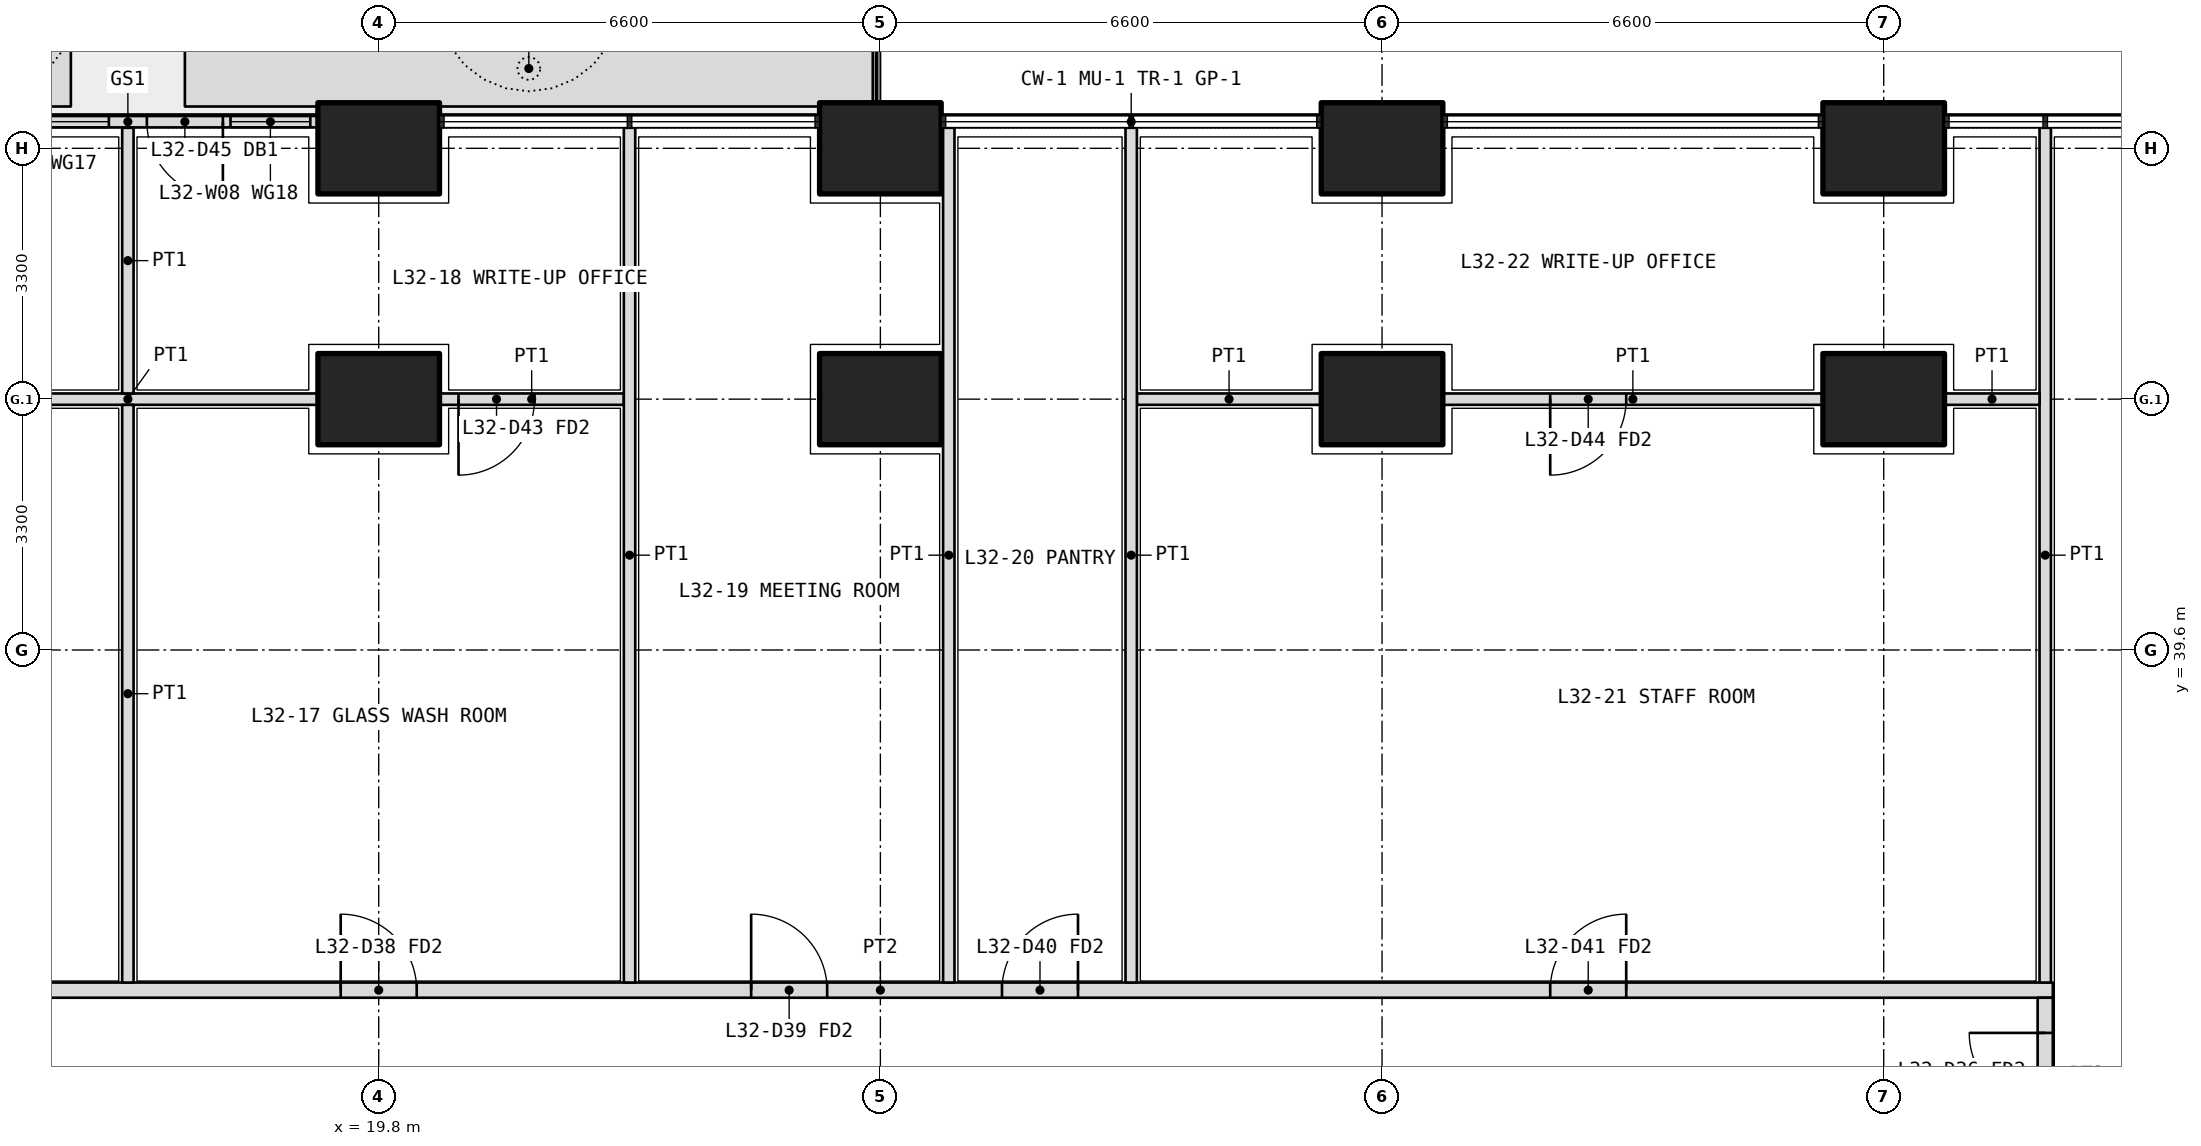
"""IFC4 building model, lengths in metres.
Left out: names, types, materials, properties, quantities, classifications, styles, units other than length and angle.
Written with IfcOpenShell. Run it as: python <this file> out.ifc"""

import sys

from ifc_helpers import new_model, si_unit, direction, frame, frame_2d, origin, origin_2d, place, context, subcontext, project, spatial, polyline, rectangle, outline, extrude, element, fill, save


model = new_model("IFC4")
c1 = context("Model", 3, precision=1e-05, world=origin(), true_north=direction((0.0, 1.0)))
c2 = subcontext(c1, "Body", "Model", "MODEL_VIEW")
j1 = project(units=[si_unit("LENGTHUNIT", "METRE"), si_unit("PLANEANGLEUNIT", "RADIAN")], contexts=[c1])
p1 = place(None, origin())
s1 = spatial("IfcSite", under=j1, at=p1, CompositionType="ELEMENT")
p2 = place(p1, origin())
s2 = spatial("IfcBuilding", under=s1, at=p2, CompositionType="ELEMENT")
p3 = place(p2, frame((0.0, 0.0, 141.0)))
s3 = spatial("IfcBuildingStorey", under=s2, at=p3, CompositionType="ELEMENT", Elevation=141.0)
for number, where, z_axis, x_axis in (
    (1, (19.8, 46.2, 0.0), (0.0, 0.0, 1.0), (1.0, 0.0, 0.0)),
    (2, (26.4, 46.2, 0.0), (0.0, 0.0, 1.0), (1.0, 0.0, 0.0)),
    (3, (33.0, 46.2, 0.0), (0.0, 0.0, 1.0), (1.0, 0.0, 0.0)),
    (4, (39.6, 46.2, 0.0), (0.0, 0.0, 1.0), (1.0, 0.0, 0.0)),
    (5, (19.8, 42.9, 0.0), (0.0, 0.0, 1.0), (1.0, 0.0, 0.0)),
    (6, (26.4, 42.9, 0.0), (0.0, 0.0, 1.0), (1.0, 0.0, 0.0)),
    (7, (33.0, 42.9, 0.0), (0.0, 0.0, 1.0), (1.0, 0.0, 0.0)),
    (8, (39.6, 42.9, 0.0), (0.0, 0.0, 1.0), (1.0, 0.0, 0.0)),
):
    element("IfcColumn", number, at=place(p3, frame(where, z_axis=z_axis, x_axis=x_axis)), inside=s3, PredefinedType="COLUMN", context=c2, shape_type="SweptSolid", body=[
        extrude(rectangle(XDim=1.6, YDim=1.2, at=origin_2d()), origin(), (0.0, 0.0, 1.0), 4.2),
    ])
p4 = place(p3, origin())
e9 = element("IfcWall", 9, at=p4, inside=s3, PredefinedType="USERDEFINED", context=c2, shape_type="SweptSolid", body=[
    extrude(outline(polyline([(13.3, 46.75), (15.75, 46.75), (15.75, 47.75), (13.3, 47.75), (13.3, 46.75)]), holes=[polyline([(13.45, 46.9), (15.6, 46.9), (15.6, 47.6), (13.45, 47.6), (13.45, 46.9)])]), origin(), (0.0, 0.0, 1.0), 1.05),
])
p5 = place(p3, origin())
e10 = element("IfcWall", 10, at=p5, inside=s3, PredefinedType="USERDEFINED", context=c2, shape_type="SweptSolid", body=[
    extrude(outline(polyline([(17.25, 46.75), (26.3, 46.75), (26.3, 47.75), (17.25, 47.75), (17.25, 46.75)]), holes=[polyline([(17.4, 46.9), (26.15, 46.9), (26.15, 47.6), (17.4, 47.6), (17.4, 46.9)])]), origin(), (0.0, 0.0, 1.0), 1.05),
])
p6 = place(p3, frame((19.0, 46.55, 0.0), z_axis=(0.0, 0.0, 1.0), x_axis=(-1.0, 0.0, 0.0)))
e11 = element("IfcWall", 11, at=p6, inside=s3, PredefinedType="SOLIDWALL", context=c2, shape_type="SweptSolid", body=[
    extrude(rectangle(XDim=5.0, YDim=0.15, at=frame_2d((2.5, 0.0))), origin(), (0.0, 0.0, 1.0), 2.6),
])
p7 = place(p6, frame((1.25, 0.0, 0.0)))
e12 = element("IfcOpeningElement", 12, at=p7, cuts=e11, PredefinedType="OPENING", context=c2, shape_type="SweptSolid", body=[
    extrude(rectangle(XDim=1.0, YDim=2.4, at=frame_2d((0.5, 1.2))), frame((0.0, 0.085, 0.0), z_axis=(0.0, -1.0, 0.0), x_axis=(1.0, 0.0, 0.0)), (0.0, 0.0, 1.0), 0.17),
])
p8 = place(p6, frame((0.1, 0.0, 0.1)))
e13 = element("IfcOpeningElement", 13, at=p8, cuts=e11, PredefinedType="OPENING", context=c2, shape_type="SweptSolid", body=[
    extrude(rectangle(XDim=1.05, YDim=2.2, at=frame_2d((0.525, 1.1))), frame((0.0, 0.085, 0.0), z_axis=(0.0, -1.0, 0.0), x_axis=(1.0, 0.0, 0.0)), (0.0, 0.0, 1.0), 0.17),
])
p9 = place(p6, frame((2.75, 0.0, 0.1)))
e14 = element("IfcOpeningElement", 14, at=p9, cuts=e11, PredefinedType="OPENING", context=c2, shape_type="SweptSolid", body=[
    extrude(rectangle(XDim=2.15, YDim=2.2, at=frame_2d((1.075, 1.1))), frame((0.0, 0.085, 0.0), z_axis=(0.0, -1.0, 0.0), x_axis=(1.0, 0.0, 0.0)), (0.0, 0.0, 1.0), 0.17),
])
p10 = place(p3, frame((10.975, 35.125, 0.0), z_axis=(0.0, 0.0, 1.0), x_axis=(1.0, 0.0, 0.0)))
e15 = element("IfcWall", 15, at=p10, inside=s3, PredefinedType="PARTITIONING", context=c2, shape_type="SweptSolid", body=[
    extrude(rectangle(XDim=30.85, YDim=0.2, at=frame_2d((15.425, 0.0))), origin(), (0.0, 0.0, 1.0), 2.85),
])
p11 = place(p10, frame((2.312, 0.0, 0.0)))
e16 = element("IfcOpeningElement", 16, at=p11, cuts=e15, PredefinedType="OPENING", context=c2, shape_type="SweptSolid", body=[
    extrude(rectangle(XDim=1.0, YDim=2.1, at=frame_2d((0.5, 1.05))), frame((0.0, 0.11, 0.0), z_axis=(0.0, -1.0, 0.0), x_axis=(1.0, 0.0, 0.0)), (0.0, 0.0, 1.0), 0.22),
])
p12 = place(p10, frame((8.325, 0.0, 0.0)))
e17 = element("IfcOpeningElement", 17, at=p12, cuts=e15, PredefinedType="OPENING", context=c2, shape_type="SweptSolid", body=[
    extrude(rectangle(XDim=1.0, YDim=2.1, at=frame_2d((0.5, 1.05))), frame((0.0, 0.11, 0.0), z_axis=(0.0, -1.0, 0.0), x_axis=(1.0, 0.0, 0.0)), (0.0, 0.0, 1.0), 0.22),
])
p13 = place(p10, frame((13.725, 0.0, 0.0)))
e18 = element("IfcOpeningElement", 18, at=p13, cuts=e15, PredefinedType="OPENING", context=c2, shape_type="SweptSolid", body=[
    extrude(rectangle(XDim=1.0, YDim=2.1, at=frame_2d((0.5, 1.05))), frame((0.0, 0.11, 0.0), z_axis=(0.0, -1.0, 0.0), x_axis=(1.0, 0.0, 0.0)), (0.0, 0.0, 1.0), 0.22),
])
p14 = place(p10, frame((17.025, 0.0, 0.0)))
e19 = element("IfcOpeningElement", 19, at=p14, cuts=e15, PredefinedType="OPENING", context=c2, shape_type="SweptSolid", body=[
    extrude(rectangle(XDim=1.0, YDim=2.1, at=frame_2d((0.5, 1.05))), frame((0.0, 0.11, 0.0), z_axis=(0.0, -1.0, 0.0), x_axis=(1.0, 0.0, 0.0)), (0.0, 0.0, 1.0), 0.22),
])
p15 = place(p10, frame((24.238, 0.0, 0.0)))
e20 = element("IfcOpeningElement", 20, at=p15, cuts=e15, PredefinedType="OPENING", context=c2, shape_type="SweptSolid", body=[
    extrude(rectangle(XDim=1.0, YDim=2.1, at=frame_2d((0.5, 1.05))), frame((0.0, 0.11, 0.0), z_axis=(0.0, -1.0, 0.0), x_axis=(1.0, 0.0, 0.0)), (0.0, 0.0, 1.0), 0.22),
])
p16 = place(p3, frame((41.725, 33.0, 0.0), z_axis=(0.0, 0.0, 1.0), x_axis=(0.0, 1.0, 0.0)))
e21 = element("IfcWall", 21, at=p16, inside=s3, PredefinedType="PARTITIONING", context=c2, shape_type="SweptSolid", body=[
    extrude(rectangle(XDim=2.025, YDim=0.2, at=frame_2d((1.012, 0.0))), origin(), (0.0, 0.0, 1.0), 2.85),
])
p17 = place(p16, frame((0.562, 0.0, 0.0)))
e22 = element("IfcOpeningElement", 22, at=p17, cuts=e21, PredefinedType="OPENING", context=c2, shape_type="SweptSolid", body=[
    extrude(rectangle(XDim=1.0, YDim=2.1, at=frame_2d((0.5, 1.05))), frame((0.0, 0.11, 0.0), z_axis=(0.0, -1.0, 0.0), x_axis=(1.0, 0.0, 0.0)), (0.0, 0.0, 1.0), 0.22),
])
p18 = place(p3, frame((41.725, 46.47, 0.0), z_axis=(0.0, 0.0, 1.0), x_axis=(0.0, -1.0, 0.0)))
e23 = element("IfcWall", 23, at=p18, inside=s3, PredefinedType="PARTITIONING", context=c2, shape_type="SweptSolid", body=[
    extrude(rectangle(XDim=11.245, YDim=0.15, at=frame_2d((5.623, 0.0))), origin(), (0.0, 0.0, 1.0), 2.6),
])
p19 = place(p3, frame((41.65, 42.9, 0.0), z_axis=(0.0, 0.0, 1.0), x_axis=(-1.0, 0.0, 0.0)))
e24 = element("IfcWall", 24, at=p19, inside=s3, PredefinedType="PARTITIONING", context=c2, shape_type="SweptSolid", body=[
    extrude(rectangle(XDim=1.25, YDim=0.15, at=frame_2d((0.625, 0.0))), origin(), (0.0, 0.0, 1.0), 2.85),
])
p20 = place(p3, frame((38.8, 42.9, 0.0), z_axis=(0.0, 0.0, 1.0), x_axis=(-1.0, 0.0, 0.0)))
e25 = element("IfcWall", 25, at=p20, inside=s3, PredefinedType="PARTITIONING", context=c2, shape_type="SweptSolid", body=[
    extrude(rectangle(XDim=5.0, YDim=0.15, at=frame_2d((2.5, 0.0))), origin(), (0.0, 0.0, 1.0), 2.85),
])
p21 = place(p20, frame((2.587, 0.0, 0.0)))
e26 = element("IfcOpeningElement", 26, at=p21, cuts=e25, PredefinedType="OPENING", context=c2, shape_type="SweptSolid", body=[
    extrude(rectangle(XDim=1.0, YDim=2.1, at=frame_2d((0.5, 1.05))), frame((0.0, 0.085, 0.0), z_axis=(0.0, -1.0, 0.0), x_axis=(1.0, 0.0, 0.0)), (0.0, 0.0, 1.0), 0.17),
])
p22 = place(p3, frame((32.2, 42.9, 0.0), z_axis=(0.0, 0.0, 1.0), x_axis=(-1.0, 0.0, 0.0)))
e27 = element("IfcWall", 27, at=p22, inside=s3, PredefinedType="PARTITIONING", context=c2, shape_type="SweptSolid", body=[
    extrude(rectangle(XDim=2.425, YDim=0.15, at=frame_2d((1.212, 0.0))), origin(), (0.0, 0.0, 1.0), 2.85),
])
p23 = place(p3, frame((23.025, 42.9, 0.0), z_axis=(0.0, 0.0, 1.0), x_axis=(-1.0, 0.0, 0.0)))
e28 = element("IfcWall", 28, at=p23, inside=s3, PredefinedType="PARTITIONING", context=c2, shape_type="SweptSolid", body=[
    extrude(rectangle(XDim=2.425, YDim=0.15, at=frame_2d((1.212, 0.0))), origin(), (0.0, 0.0, 1.0), 2.85),
])
p24 = place(p23, frame((1.175, 0.0, 0.0)))
e29 = element("IfcOpeningElement", 29, at=p24, cuts=e28, PredefinedType="OPENING", context=c2, shape_type="SweptSolid", body=[
    extrude(rectangle(XDim=1.0, YDim=2.1, at=frame_2d((0.5, 1.05))), frame((0.0, 0.085, 0.0), z_axis=(0.0, -1.0, 0.0), x_axis=(1.0, 0.0, 0.0)), (0.0, 0.0, 1.0), 0.17),
])
p25 = place(p3, frame((19.0, 42.9, 0.0), z_axis=(0.0, 0.0, 1.0), x_axis=(-1.0, 0.0, 0.0)))
e30 = element("IfcWall", 30, at=p25, inside=s3, PredefinedType="PARTITIONING", context=c2, shape_type="SweptSolid", body=[
    extrude(rectangle(XDim=5.0, YDim=0.15, at=frame_2d((2.5, 0.0))), origin(), (0.0, 0.0, 1.0), 2.85),
])
p26 = place(p3, frame((27.3, 46.47, 0.0), z_axis=(0.0, 0.0, 1.0), x_axis=(0.0, -1.0, 0.0)))
e31 = element("IfcWall", 31, at=p26, inside=s3, PredefinedType="PARTITIONING", context=c2, shape_type="SweptSolid", body=[
    extrude(rectangle(XDim=11.245, YDim=0.15, at=frame_2d((5.623, 0.0))), origin(), (0.0, 0.0, 1.0), 2.6),
])
p27 = place(p3, frame((16.5, 46.47, 0.0), z_axis=(0.0, 0.0, 1.0), x_axis=(0.0, -1.0, 0.0)))
e32 = element("IfcWall", 32, at=p27, inside=s3, PredefinedType="PARTITIONING", context=c2, shape_type="SweptSolid", body=[
    extrude(rectangle(XDim=3.495, YDim=0.15, at=frame_2d((1.748, 0.0))), origin(), (0.0, 0.0, 1.0), 2.6),
])
p28 = place(p3, frame((16.5, 42.825, 0.0), z_axis=(0.0, 0.0, 1.0), x_axis=(0.0, -1.0, 0.0)))
e33 = element("IfcWall", 33, at=p28, inside=s3, PredefinedType="PARTITIONING", context=c2, shape_type="SweptSolid", body=[
    extrude(rectangle(XDim=7.6, YDim=0.15, at=frame_2d((3.8, 0.0))), origin(), (0.0, 0.0, 1.0), 3.9),
])
for number, where, z_axis, x_axis in (
    (34, (23.1, 46.47, 0.0), (0.0, 0.0, 1.0), (0.0, -1.0, 0.0)),
    (35, (29.7, 46.47, 0.0), (0.0, 0.0, 1.0), (0.0, -1.0, 0.0)),
):
    element("IfcWall", number, at=place(p3, frame(where, z_axis=z_axis, x_axis=x_axis)), inside=s3, PredefinedType="PARTITIONING", context=c2, shape_type="SweptSolid", body=[
        extrude(rectangle(XDim=11.245, YDim=0.15, at=frame_2d((5.623, 0.0))), origin(), (0.0, 0.0, 1.0), 2.6),
    ])
p29 = place(p7, origin())
e36 = element("IfcDoor", 36, at=p29, inside=s3, OperationType="SINGLE_SWING_LEFT", PredefinedType="DOOR", context=c2, shape_type="SweptSolid", body=[
    extrude(rectangle(XDim=1.0, YDim=2.4, at=frame_2d((0.5, 1.2))), frame((0.0, 0.025, 0.0), z_axis=(0.0, -1.0, 0.0), x_axis=(1.0, 0.0, 0.0)), (0.0, 0.0, 1.0), 0.05),
])
fill(e12, e36)
p30 = place(p8, origin())
e37 = element("IfcWindow", 37, at=p30, inside=s3, PartitioningType="SINGLE_PANEL", PredefinedType="WINDOW", context=c2, shape_type="SweptSolid", body=[
    extrude(rectangle(XDim=1.05, YDim=2.2, at=frame_2d((0.525, 1.1))), frame((0.0, 0.03, 0.0), z_axis=(0.0, -1.0, 0.0), x_axis=(1.0, 0.0, 0.0)), (0.0, 0.0, 1.0), 0.06),
])
fill(e13, e37)
p31 = place(p9, origin())
e38 = element("IfcWindow", 38, at=p31, inside=s3, PartitioningType="SINGLE_PANEL", PredefinedType="WINDOW", context=c2, shape_type="SweptSolid", body=[
    extrude(rectangle(XDim=2.15, YDim=2.2, at=frame_2d((1.075, 1.1))), frame((0.0, 0.03, 0.0), z_axis=(0.0, -1.0, 0.0), x_axis=(1.0, 0.0, 0.0)), (0.0, 0.0, 1.0), 0.06),
])
fill(e14, e38)
p32 = place(p17, origin())
e39 = element("IfcDoor", 39, at=p32, inside=s3, OperationType="SINGLE_SWING_RIGHT", PredefinedType="DOOR", context=c2, shape_type="SweptSolid", body=[
    extrude(rectangle(XDim=1.0, YDim=2.1, at=frame_2d((0.5, 1.05))), frame((0.0, 0.025, 0.0), z_axis=(0.0, -1.0, 0.0), x_axis=(1.0, 0.0, 0.0)), (0.0, 0.0, 1.0), 0.05),
])
fill(e22, e39)
p33 = place(p12, origin())
e40 = element("IfcDoor", 40, at=p33, inside=s3, OperationType="SINGLE_SWING_LEFT", PredefinedType="DOOR", context=c2, shape_type="SweptSolid", body=[
    extrude(rectangle(XDim=1.0, YDim=2.1, at=frame_2d((0.5, 1.05))), frame((0.0, 0.025, 0.0), z_axis=(0.0, -1.0, 0.0), x_axis=(1.0, 0.0, 0.0)), (0.0, 0.0, 1.0), 0.05),
])
fill(e17, e40)
p34 = place(p24, origin())
e41 = element("IfcDoor", 41, at=p34, inside=s3, OperationType="SINGLE_SWING_RIGHT", PredefinedType="DOOR", context=c2, shape_type="SweptSolid", body=[
    extrude(rectangle(XDim=1.0, YDim=2.1, at=frame_2d((0.5, 1.05))), frame((0.0, 0.025, 0.0), z_axis=(0.0, -1.0, 0.0), x_axis=(1.0, 0.0, 0.0)), (0.0, 0.0, 1.0), 0.05),
])
fill(e29, e41)
p35 = place(p13, origin())
e42 = element("IfcDoor", 42, at=p35, inside=s3, OperationType="SINGLE_SWING_LEFT", PredefinedType="DOOR", context=c2, shape_type="SweptSolid", body=[
    extrude(rectangle(XDim=1.0, YDim=2.1, at=frame_2d((0.5, 1.05))), frame((0.0, 0.025, 0.0), z_axis=(0.0, -1.0, 0.0), x_axis=(1.0, 0.0, 0.0)), (0.0, 0.0, 1.0), 0.05),
])
fill(e18, e42)
p36 = place(p14, origin())
e43 = element("IfcDoor", 43, at=p36, inside=s3, OperationType="SINGLE_SWING_RIGHT", PredefinedType="DOOR", context=c2, shape_type="SweptSolid", body=[
    extrude(rectangle(XDim=1.0, YDim=2.1, at=frame_2d((0.5, 1.05))), frame((0.0, 0.025, 0.0), z_axis=(0.0, -1.0, 0.0), x_axis=(1.0, 0.0, 0.0)), (0.0, 0.0, 1.0), 0.05),
])
fill(e19, e43)
p37 = place(p15, origin())
e44 = element("IfcDoor", 44, at=p37, inside=s3, OperationType="SINGLE_SWING_RIGHT", PredefinedType="DOOR", context=c2, shape_type="SweptSolid", body=[
    extrude(rectangle(XDim=1.0, YDim=2.1, at=frame_2d((0.5, 1.05))), frame((0.0, 0.025, 0.0), z_axis=(0.0, -1.0, 0.0), x_axis=(1.0, 0.0, 0.0)), (0.0, 0.0, 1.0), 0.05),
])
fill(e20, e44)
p38 = place(p21, origin())
e45 = element("IfcDoor", 45, at=p38, inside=s3, OperationType="SINGLE_SWING_RIGHT", PredefinedType="DOOR", context=c2, shape_type="SweptSolid", body=[
    extrude(rectangle(XDim=1.0, YDim=2.1, at=frame_2d((0.5, 1.05))), frame((0.0, 0.025, 0.0), z_axis=(0.0, -1.0, 0.0), x_axis=(1.0, 0.0, 0.0)), (0.0, 0.0, 1.0), 0.05),
])
fill(e26, e45)
save(model, sys.argv[1])
